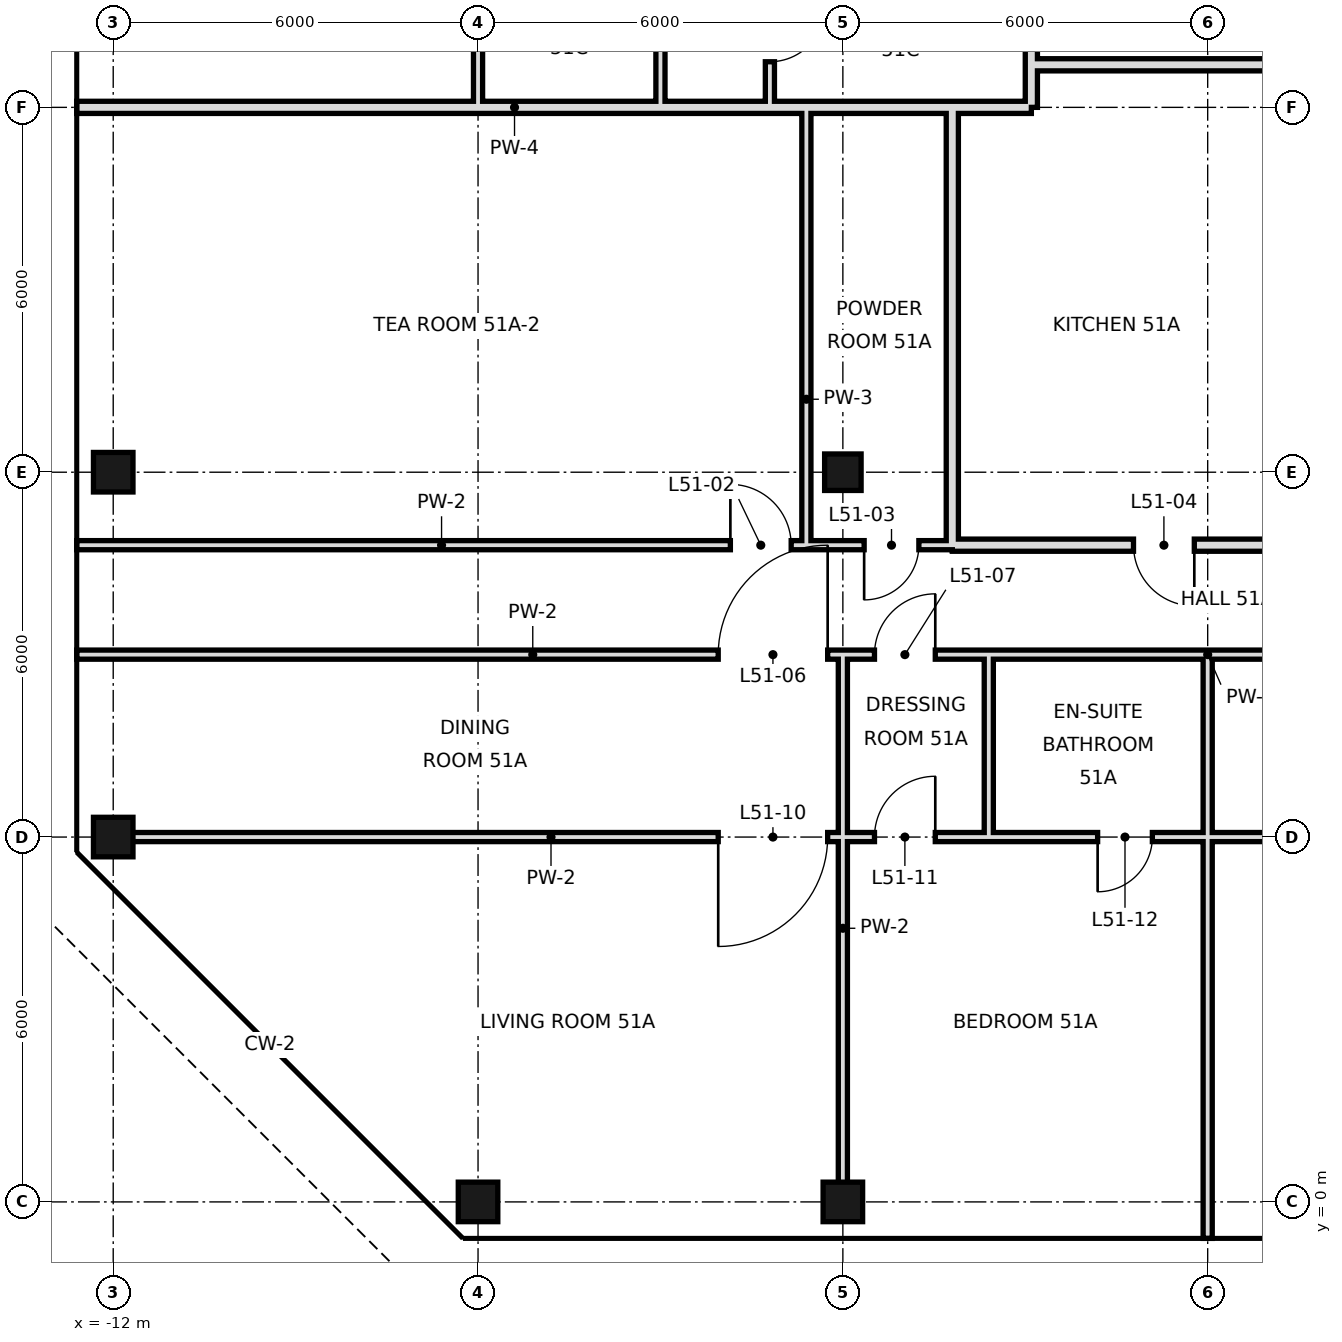
"""IFC4 building model, lengths in metres.
Left out: names, types, materials, properties, quantities, classifications, styles, units other than length and angle.
Written with IfcOpenShell. Run it as: python <this file> out.ifc"""

import sys

from ifc_helpers import new_model, si_unit, direction, frame, frame_2d, origin, origin_2d, place, context, subcontext, project, spatial, rectangle, hollow_rectangle, extrude, element, fill, save


model = new_model("IFC4")
c1 = context("Model", 3, precision=1e-05, world=origin(), true_north=direction((0.0, 1.0)))
c2 = subcontext(c1, "Body", "Model", "MODEL_VIEW")
j1 = project(units=[si_unit("LENGTHUNIT", "METRE"), si_unit("PLANEANGLEUNIT", "RADIAN")], contexts=[c1])
p1 = place(None, origin())
s1 = spatial("IfcSite", under=j1, at=p1, CompositionType="ELEMENT")
p2 = place(p1, origin())
s2 = spatial("IfcBuilding", under=s1, at=p2, CompositionType="ELEMENT")
p3 = place(p2, frame((0.0, 0.0, 219.0)))
s3 = spatial("IfcBuildingStorey", under=s2, at=p3, CompositionType="ELEMENT", Elevation=219.0)
for number, where, z_axis, x_axis in (
    (1, (-12.0, 6.0, 0.0), (0.0, 0.0, 1.0), (1.0, 0.0, 0.0)),
    (2, (-12.0, 12.0, 0.0), (0.0, 0.0, 1.0), (1.0, 0.0, 0.0)),
    (3, (-6.0, 0.0, 0.0), (0.0, 0.0, 1.0), (1.0, 0.0, 0.0)),
    (4, (0.0, 0.0, 0.0), (0.0, 0.0, 1.0), (1.0, 0.0, 0.0)),
):
    element("IfcColumn", number, at=place(p3, frame(where, z_axis=z_axis, x_axis=x_axis)), inside=s3, PredefinedType="COLUMN", context=c2, shape_type="SweptSolid", body=[
        extrude(hollow_rectangle(XDim=0.65, YDim=0.65, WallThickness=0.032, at=origin_2d()), origin(), (0.0, 0.0, 1.0), 3.6),
    ])
p4 = place(p3, frame((0.0, 12.0, 0.0), z_axis=(0.0, 0.0, 1.0), x_axis=(1.0, 0.0, 0.0)))
e5 = element("IfcColumn", 5, at=p4, inside=s3, PredefinedType="COLUMN", context=c2, shape_type="SweptSolid", body=[
    extrude(hollow_rectangle(XDim=0.6, YDim=0.6, WallThickness=0.028, at=origin_2d()), origin(), (0.0, 0.0, 1.0), 3.6),
])
p5 = place(p3, frame((-0.6, 10.8, 0.0), z_axis=(0.0, 0.0, 1.0), x_axis=(0.0, 1.0, 0.0)))
e6 = element("IfcWall", 6, at=p5, inside=s3, PredefinedType="PARTITIONING", context=c2, shape_type="SweptSolid", body=[
    extrude(rectangle(XDim=7.2, YDim=0.15, at=frame_2d((3.6, 0.0))), origin(), (0.0, 0.0, 1.0), 3.42),
])
p6 = place(p3, frame((-1.2, 18.0, 0.0), z_axis=(0.0, 0.0, 1.0), x_axis=(0.0, 1.0, 0.0)))
e7 = element("IfcWall", 7, at=p6, inside=s3, PredefinedType="PARTITIONING", context=c2, shape_type="SweptSolid", body=[
    extrude(rectangle(XDim=2.4, YDim=0.15, at=frame_2d((1.2, 0.0))), origin(), (0.0, 0.0, 1.0), 3.42),
])
p7 = place(p6, frame((0.75, 0.0, 0.0)))
e8 = element("IfcOpeningElement", 8, at=p7, cuts=e7, PredefinedType="OPENING", context=c2, shape_type="SweptSolid", body=[
    extrude(rectangle(XDim=0.9, YDim=2.4, at=frame_2d((0.45, 1.2))), frame((0.0, 0.085, 0.0), z_axis=(0.0, -1.0, 0.0), x_axis=(1.0, 0.0, 0.0)), (0.0, 0.0, 1.0), 0.17),
])
p8 = place(p3, frame((-3.0, 18.0, 0.0), z_axis=(0.0, 0.0, 1.0), x_axis=(0.0, 1.0, 0.0)))
e9 = element("IfcWall", 9, at=p8, inside=s3, PredefinedType="PARTITIONING", context=c2, shape_type="SweptSolid", body=[
    extrude(rectangle(XDim=3.0, YDim=0.15, at=frame_2d((1.5, 0.0))), origin(), (0.0, 0.0, 1.0), 3.42),
])
p9 = place(p3, frame((-6.0, 18.0, 0.0), z_axis=(0.0, 0.0, 1.0), x_axis=(0.0, 1.0, 0.0)))
e10 = element("IfcWall", 10, at=p9, inside=s3, PredefinedType="PARTITIONING", context=c2, shape_type="SweptSolid", body=[
    extrude(rectangle(XDim=3.0, YDim=0.15, at=frame_2d((1.5, 0.0))), origin(), (0.0, 0.0, 1.0), 3.42),
])
p10 = place(p9, frame((1.05, 0.0, 0.0)))
e11 = element("IfcOpeningElement", 11, at=p10, cuts=e10, PredefinedType="OPENING", context=c2, shape_type="SweptSolid", body=[
    extrude(rectangle(XDim=0.9, YDim=2.4, at=frame_2d((0.45, 1.2))), frame((0.0, 0.085, 0.0), z_axis=(0.0, -1.0, 0.0), x_axis=(1.0, 0.0, 0.0)), (0.0, 0.0, 1.0), 0.17),
])
p11 = place(p3, frame((0.0, 0.0, 0.0), z_axis=(0.0, 0.0, 1.0), x_axis=(0.0, 1.0, 0.0)))
e12 = element("IfcWall", 12, at=p11, inside=s3, PredefinedType="PARTITIONING", context=c2, shape_type="SweptSolid", body=[
    extrude(rectangle(XDim=9.0, YDim=0.15, at=frame_2d((4.5, 0.0))), origin(), (0.0, 0.0, 1.0), 2.72),
])
p12 = place(p3, frame((1.8, 10.8, 0.0), z_axis=(0.0, 0.0, 1.0), x_axis=(0.0, 1.0, 0.0)))
e13 = element("IfcWall", 13, at=p12, inside=s3, PredefinedType="SOLIDWALL", context=c2, shape_type="SweptSolid", body=[
    extrude(rectangle(XDim=7.2, YDim=0.2, at=frame_2d((3.6, 0.0))), origin(), (0.0, 0.0, 1.0), 3.42),
])
p13 = place(p3, frame((2.4, 6.0, 0.0), z_axis=(0.0, 0.0, 1.0), x_axis=(0.0, 1.0, 0.0)))
e14 = element("IfcWall", 14, at=p13, inside=s3, PredefinedType="PARTITIONING", context=c2, shape_type="SweptSolid", body=[
    extrude(rectangle(XDim=3.0, YDim=0.15, at=frame_2d((1.5, 0.0))), origin(), (0.0, 0.0, 1.0), 3.42),
])
p14 = place(p3, frame((3.1, 18.7, 0.0), z_axis=(0.0, 0.0, 1.0), x_axis=(0.0, 1.0, 0.0)))
e15 = element("IfcWall", 15, at=p14, inside=s3, PredefinedType="SOLIDWALL", context=c2, shape_type="SweptSolid", body=[
    extrude(rectangle(XDim=15.5, YDim=0.2, at=frame_2d((7.75, 0.0))), origin(), (0.0, 0.0, 1.0), 2.97),
])
p15 = place(p14, frame((4.96, 0.0, 0.0)))
e16 = element("IfcOpeningElement", 16, at=p15, cuts=e15, PredefinedType="OPENING", context=c2, shape_type="SweptSolid", body=[
    extrude(rectangle(XDim=1.2, YDim=2.4, at=frame_2d((0.6, 1.2))), frame((0.0, 0.11, 0.0), z_axis=(0.0, -1.0, 0.0), x_axis=(1.0, 0.0, 0.0)), (0.0, 0.0, 1.0), 0.22),
])
p16 = place(p3, frame((3.1, 18.0, 0.0), z_axis=(0.0, 0.0, 1.0), x_axis=(0.0, 1.0, 0.0)))
e17 = element("IfcWall", 17, at=p16, inside=s3, PredefinedType="SOLIDWALL", context=c2, shape_type="SweptSolid", body=[
    extrude(rectangle(XDim=0.7, YDim=0.2, at=frame_2d((0.35, 0.0))), origin(), (0.0, 0.0, 1.0), 2.97),
])
p17 = place(p3, frame((6.0, -0.6, 0.0), z_axis=(0.0, 0.0, 1.0), x_axis=(0.0, 1.0, 0.0)))
e18 = element("IfcWall", 18, at=p17, inside=s3, PredefinedType="PARTITIONING", context=c2, shape_type="SweptSolid", body=[
    extrude(rectangle(XDim=6.6, YDim=0.15, at=frame_2d((3.3, 0.0))), origin(), (0.0, 0.0, 1.0), 2.72),
])
p18 = place(p3, frame((6.0, 6.0, 0.0), z_axis=(0.0, 0.0, 1.0), x_axis=(0.0, 1.0, 0.0)))
e19 = element("IfcWall", 19, at=p18, inside=s3, PredefinedType="PARTITIONING", context=c2, shape_type="SweptSolid", body=[
    extrude(rectangle(XDim=3.0, YDim=0.15, at=frame_2d((1.5, 0.0))), origin(), (0.0, 0.0, 1.0), 2.72),
])
p19 = place(p3, frame((1.8, 10.8, 0.0), z_axis=(0.0, 0.0, 1.0), x_axis=(1.0, 0.0, 0.0)))
e20 = element("IfcWall", 20, at=p19, inside=s3, PredefinedType="SOLIDWALL", context=c2, shape_type="SweptSolid", body=[
    extrude(rectangle(XDim=5.4, YDim=0.2, at=frame_2d((2.7, 0.0))), origin(), (0.0, 0.0, 1.0), 2.72),
])
p20 = place(p19, frame((2.98, 0.0, 0.0)))
e21 = element("IfcOpeningElement", 21, at=p20, cuts=e20, PredefinedType="OPENING", context=c2, shape_type="SweptSolid", body=[
    extrude(rectangle(XDim=1.0, YDim=2.4, at=frame_2d((0.5, 1.2))), frame((0.0, 0.11, 0.0), z_axis=(0.0, -1.0, 0.0), x_axis=(1.0, 0.0, 0.0)), (0.0, 0.0, 1.0), 0.22),
])
p21 = place(p3, frame((-12.6, 10.8, 0.0), z_axis=(0.0, 0.0, 1.0), x_axis=(1.0, 0.0, 0.0)))
e22 = element("IfcWall", 22, at=p21, inside=s3, PredefinedType="PARTITIONING", context=c2, shape_type="SweptSolid", body=[
    extrude(rectangle(XDim=12.0, YDim=0.15, at=frame_2d((6.0, 0.0))), origin(), (0.0, 0.0, 1.0), 3.42),
])
p22 = place(p21, frame((10.75, 0.0, 0.0)))
e23 = element("IfcOpeningElement", 23, at=p22, cuts=e22, PredefinedType="OPENING", context=c2, shape_type="SweptSolid", body=[
    extrude(rectangle(XDim=1.0, YDim=2.4, at=frame_2d((0.5, 1.2))), frame((0.0, 0.085, 0.0), z_axis=(0.0, -1.0, 0.0), x_axis=(1.0, 0.0, 0.0)), (0.0, 0.0, 1.0), 0.17),
])
p23 = place(p3, frame((-0.6, 10.8, 0.0), z_axis=(0.0, 0.0, 1.0), x_axis=(1.0, 0.0, 0.0)))
e24 = element("IfcWall", 24, at=p23, inside=s3, PredefinedType="PARTITIONING", context=c2, shape_type="SweptSolid", body=[
    extrude(rectangle(XDim=2.4, YDim=0.15, at=frame_2d((1.2, 0.0))), origin(), (0.0, 0.0, 1.0), 3.42),
])
p24 = place(p23, frame((0.95, 0.0, 0.0)))
e25 = element("IfcOpeningElement", 25, at=p24, cuts=e24, PredefinedType="OPENING", context=c2, shape_type="SweptSolid", body=[
    extrude(rectangle(XDim=0.9, YDim=2.4, at=frame_2d((0.45, 1.2))), frame((0.0, 0.085, 0.0), z_axis=(0.0, -1.0, 0.0), x_axis=(1.0, 0.0, 0.0)), (0.0, 0.0, 1.0), 0.17),
])
p25 = place(p3, frame((1.8, 18.0, 0.0), z_axis=(0.0, 0.0, 1.0), x_axis=(1.0, 0.0, 0.0)))
e26 = element("IfcWall", 26, at=p25, inside=s3, PredefinedType="SOLIDWALL", context=c2, shape_type="SweptSolid", body=[
    extrude(rectangle(XDim=1.3, YDim=0.2, at=frame_2d((0.65, 0.0))), origin(), (0.0, 0.0, 1.0), 2.97),
])
p26 = place(p3, frame((-12.6, 18.0, 0.0), z_axis=(0.0, 0.0, 1.0), x_axis=(1.0, 0.0, 0.0)))
e27 = element("IfcWall", 27, at=p26, inside=s3, PredefinedType="SOLIDWALL", context=c2, shape_type="SweptSolid", body=[
    extrude(rectangle(XDim=14.4, YDim=0.2, at=frame_2d((7.2, 0.0))), origin(), (0.0, 0.0, 1.0), 2.72),
])
p27 = place(p3, frame((3.1, 18.7, 0.0), z_axis=(0.0, 0.0, 1.0), x_axis=(1.0, 0.0, 0.0)))
e28 = element("IfcWall", 28, at=p27, inside=s3, PredefinedType="SOLIDWALL", context=c2, shape_type="SweptSolid", body=[
    extrude(rectangle(XDim=4.1, YDim=0.2, at=frame_2d((2.05, 0.0))), origin(), (0.0, 0.0, 1.0), 2.72),
])
p28 = place(p3, frame((-12.0, 6.0, 0.0), z_axis=(0.0, 0.0, 1.0), x_axis=(1.0, 0.0, 0.0)))
e29 = element("IfcWall", 29, at=p28, inside=s3, PredefinedType="PARTITIONING", context=c2, shape_type="SweptSolid", body=[
    extrude(rectangle(XDim=14.4, YDim=0.15, at=frame_2d((7.2, 0.0))), origin(), (0.0, 0.0, 1.0), 2.72),
])
p29 = place(p28, frame((9.95, 0.0, 0.0)))
e30 = element("IfcOpeningElement", 30, at=p29, cuts=e29, PredefinedType="OPENING", context=c2, shape_type="SweptSolid", body=[
    extrude(rectangle(XDim=1.8, YDim=2.4, at=frame_2d((0.9, 1.2))), frame((0.0, 0.085, 0.0), z_axis=(0.0, -1.0, 0.0), x_axis=(1.0, 0.0, 0.0)), (0.0, 0.0, 1.0), 0.17),
])
p30 = place(p28, frame((12.52, 0.0, 0.0)))
e31 = element("IfcOpeningElement", 31, at=p30, cuts=e29, PredefinedType="OPENING", context=c2, shape_type="SweptSolid", body=[
    extrude(rectangle(XDim=1.0, YDim=2.4, at=frame_2d((0.5, 1.2))), frame((0.0, 0.085, 0.0), z_axis=(0.0, -1.0, 0.0), x_axis=(1.0, 0.0, 0.0)), (0.0, 0.0, 1.0), 0.17),
])
p31 = place(p3, frame((6.0, 6.0, 0.0), z_axis=(0.0, 0.0, 1.0), x_axis=(1.0, 0.0, 0.0)))
e32 = element("IfcWall", 32, at=p31, inside=s3, PredefinedType="PARTITIONING", context=c2, shape_type="SweptSolid", body=[
    extrude(rectangle(XDim=12.0, YDim=0.15, at=frame_2d((6.0, 0.0))), origin(), (0.0, 0.0, 1.0), 2.97),
])
p32 = place(p31, frame((3.4, 0.0, 0.0)))
e33 = element("IfcOpeningElement", 33, at=p32, cuts=e32, PredefinedType="OPENING", context=c2, shape_type="SweptSolid", body=[
    extrude(rectangle(XDim=1.0, YDim=2.4, at=frame_2d((0.5, 1.2))), frame((0.0, 0.085, 0.0), z_axis=(0.0, -1.0, 0.0), x_axis=(1.0, 0.0, 0.0)), (0.0, 0.0, 1.0), 0.17),
])
p33 = place(p3, frame((2.4, 6.0, 0.0), z_axis=(0.0, 0.0, 1.0), x_axis=(1.0, 0.0, 0.0)))
e34 = element("IfcWall", 34, at=p33, inside=s3, PredefinedType="PARTITIONING", context=c2, shape_type="SweptSolid", body=[
    extrude(rectangle(XDim=3.6, YDim=0.15, at=frame_2d((1.8, 0.0))), origin(), (0.0, 0.0, 1.0), 2.97),
])
p34 = place(p33, frame((1.79, 0.0, 0.0)))
e35 = element("IfcOpeningElement", 35, at=p34, cuts=e34, PredefinedType="OPENING", context=c2, shape_type="SweptSolid", body=[
    extrude(rectangle(XDim=0.9, YDim=2.4, at=frame_2d((0.45, 1.2))), frame((0.0, 0.085, 0.0), z_axis=(0.0, -1.0, 0.0), x_axis=(1.0, 0.0, 0.0)), (0.0, 0.0, 1.0), 0.17),
])
p35 = place(p3, frame((-12.6, 9.0, 0.0), z_axis=(0.0, 0.0, 1.0), x_axis=(1.0, 0.0, 0.0)))
e36 = element("IfcWall", 36, at=p35, inside=s3, PredefinedType="PARTITIONING", context=c2, shape_type="SweptSolid", body=[
    extrude(rectangle(XDim=15.0, YDim=0.15, at=frame_2d((7.5, 0.0))), origin(), (0.0, 0.0, 1.0), 3.42),
])
p36 = place(p35, frame((10.55, 0.0, 0.0)))
e37 = element("IfcOpeningElement", 37, at=p36, cuts=e36, PredefinedType="OPENING", context=c2, shape_type="SweptSolid", body=[
    extrude(rectangle(XDim=1.8, YDim=2.4, at=frame_2d((0.9, 1.2))), frame((0.0, 0.085, 0.0), z_axis=(0.0, -1.0, 0.0), x_axis=(1.0, 0.0, 0.0)), (0.0, 0.0, 1.0), 0.17),
])
p37 = place(p35, frame((13.12, 0.0, 0.0)))
e38 = element("IfcOpeningElement", 38, at=p37, cuts=e36, PredefinedType="OPENING", context=c2, shape_type="SweptSolid", body=[
    extrude(rectangle(XDim=1.0, YDim=2.4, at=frame_2d((0.5, 1.2))), frame((0.0, 0.085, 0.0), z_axis=(0.0, -1.0, 0.0), x_axis=(1.0, 0.0, 0.0)), (0.0, 0.0, 1.0), 0.17),
])
p38 = place(p3, frame((6.0, 9.0, 0.0), z_axis=(0.0, 0.0, 1.0), x_axis=(1.0, 0.0, 0.0)))
e39 = element("IfcWall", 39, at=p38, inside=s3, PredefinedType="PARTITIONING", context=c2, shape_type="SweptSolid", body=[
    extrude(rectangle(XDim=18.0, YDim=0.15, at=frame_2d((9.0, 0.0))), origin(), (0.0, 0.0, 1.0), 3.42),
])
p39 = place(p38, frame((5.5, 0.0, 0.0)))
e40 = element("IfcOpeningElement", 40, at=p39, cuts=e39, PredefinedType="OPENING", context=c2, shape_type="SweptSolid", body=[
    extrude(rectangle(XDim=1.0, YDim=2.4, at=frame_2d((0.5, 1.2))), frame((0.0, 0.085, 0.0), z_axis=(0.0, -1.0, 0.0), x_axis=(1.0, 0.0, 0.0)), (0.0, 0.0, 1.0), 0.17),
])
p40 = place(p38, frame((13.6, 0.0, 0.0)))
e41 = element("IfcOpeningElement", 41, at=p40, cuts=e39, PredefinedType="OPENING", context=c2, shape_type="SweptSolid", body=[
    extrude(rectangle(XDim=1.0, YDim=2.4, at=frame_2d((0.5, 1.2))), frame((0.0, 0.085, 0.0), z_axis=(0.0, -1.0, 0.0), x_axis=(1.0, 0.0, 0.0)), (0.0, 0.0, 1.0), 0.17),
])
p41 = place(p3, frame((2.4, 9.0, 0.0), z_axis=(0.0, 0.0, 1.0), x_axis=(1.0, 0.0, 0.0)))
e42 = element("IfcWall", 42, at=p41, inside=s3, PredefinedType="PARTITIONING", context=c2, shape_type="SweptSolid", body=[
    extrude(rectangle(XDim=3.6, YDim=0.15, at=frame_2d((1.8, 0.0))), origin(), (0.0, 0.0, 1.0), 3.42),
])
p42 = place(p22, origin())
e43 = element("IfcDoor", 43, at=p42, inside=s3, OperationType="SINGLE_SWING_LEFT", PredefinedType="DOOR", context=c2, shape_type="SweptSolid", body=[
    extrude(rectangle(XDim=1.0, YDim=2.4, at=frame_2d((0.5, 1.2))), frame((0.0, 0.025, 0.0), z_axis=(0.0, -1.0, 0.0), x_axis=(1.0, 0.0, 0.0)), (0.0, 0.0, 1.0), 0.05),
])
fill(e23, e43)
p43 = place(p24, frame((0.9, 0.0, 0.0), z_axis=(0.0, 0.0, 1.0), x_axis=(-1.0, 0.0, 0.0)))
e44 = element("IfcDoor", 44, at=p43, inside=s3, OperationType="SINGLE_SWING_RIGHT", PredefinedType="DOOR", context=c2, shape_type="SweptSolid", body=[
    extrude(rectangle(XDim=0.9, YDim=2.4, at=frame_2d((0.45, 1.2))), frame((0.0, 0.025, 0.0), z_axis=(0.0, -1.0, 0.0), x_axis=(1.0, 0.0, 0.0)), (0.0, 0.0, 1.0), 0.05),
])
fill(e25, e44)
p44 = place(p20, origin())
e45 = element("IfcDoor", 45, at=p44, inside=s3, OperationType="SINGLE_SWING_RIGHT", PredefinedType="DOOR", context=c2, shape_type="SweptSolid", body=[
    extrude(rectangle(XDim=1.0, YDim=2.4, at=frame_2d((0.5, 1.2))), frame((0.0, 0.025, 0.0), z_axis=(0.0, -1.0, 0.0), x_axis=(1.0, 0.0, 0.0)), (0.0, 0.0, 1.0), 0.05),
])
fill(e21, e45)
p45 = place(p36, frame((1.8, 0.0, 0.0), z_axis=(0.0, 0.0, 1.0), x_axis=(-1.0, 0.0, 0.0)))
e46 = element("IfcDoor", 46, at=p45, inside=s3, OperationType="SINGLE_SWING_LEFT", PredefinedType="DOOR", context=c2, shape_type="SweptSolid", body=[
    extrude(rectangle(XDim=1.8, YDim=2.4, at=frame_2d((0.9, 1.2))), frame((0.0, 0.025, 0.0), z_axis=(0.0, -1.0, 0.0), x_axis=(1.0, 0.0, 0.0)), (0.0, 0.0, 1.0), 0.05),
])
fill(e37, e46)
p46 = place(p37, frame((1.0, 0.0, 0.0), z_axis=(0.0, 0.0, 1.0), x_axis=(-1.0, 0.0, 0.0)))
e47 = element("IfcDoor", 47, at=p46, inside=s3, OperationType="SINGLE_SWING_LEFT", PredefinedType="DOOR", context=c2, shape_type="SweptSolid", body=[
    extrude(rectangle(XDim=1.0, YDim=2.4, at=frame_2d((0.5, 1.2))), frame((0.0, 0.025, 0.0), z_axis=(0.0, -1.0, 0.0), x_axis=(1.0, 0.0, 0.0)), (0.0, 0.0, 1.0), 0.05),
])
fill(e38, e47)
p47 = place(p29, frame((1.8, 0.0, 0.0), z_axis=(0.0, 0.0, 1.0), x_axis=(-1.0, 0.0, 0.0)))
e48 = element("IfcDoor", 48, at=p47, inside=s3, OperationType="SINGLE_SWING_RIGHT", PredefinedType="DOOR", context=c2, shape_type="SweptSolid", body=[
    extrude(rectangle(XDim=1.8, YDim=2.4, at=frame_2d((0.9, 1.2))), frame((0.0, 0.025, 0.0), z_axis=(0.0, -1.0, 0.0), x_axis=(1.0, 0.0, 0.0)), (0.0, 0.0, 1.0), 0.05),
])
fill(e30, e48)
p48 = place(p30, frame((1.0, 0.0, 0.0), z_axis=(0.0, 0.0, 1.0), x_axis=(-1.0, 0.0, 0.0)))
e49 = element("IfcDoor", 49, at=p48, inside=s3, OperationType="SINGLE_SWING_LEFT", PredefinedType="DOOR", context=c2, shape_type="SweptSolid", body=[
    extrude(rectangle(XDim=1.0, YDim=2.4, at=frame_2d((0.5, 1.2))), frame((0.0, 0.025, 0.0), z_axis=(0.0, -1.0, 0.0), x_axis=(1.0, 0.0, 0.0)), (0.0, 0.0, 1.0), 0.05),
])
fill(e31, e49)
p49 = place(p34, frame((0.9, 0.0, 0.0), z_axis=(0.0, 0.0, 1.0), x_axis=(-1.0, 0.0, 0.0)))
e50 = element("IfcDoor", 50, at=p49, inside=s3, OperationType="SINGLE_SWING_RIGHT", PredefinedType="DOOR", context=c2, shape_type="SweptSolid", body=[
    extrude(rectangle(XDim=0.9, YDim=2.4, at=frame_2d((0.45, 1.2))), frame((0.0, 0.025, 0.0), z_axis=(0.0, -1.0, 0.0), x_axis=(1.0, 0.0, 0.0)), (0.0, 0.0, 1.0), 0.05),
])
fill(e35, e50)
p50 = place(p7, origin())
e51 = element("IfcDoor", 51, at=p50, inside=s3, OperationType="SINGLE_SWING_RIGHT", PredefinedType="DOOR", context=c2, shape_type="SweptSolid", body=[
    extrude(rectangle(XDim=0.9, YDim=2.4, at=frame_2d((0.45, 1.2))), frame((0.0, 0.025, 0.0), z_axis=(0.0, -1.0, 0.0), x_axis=(1.0, 0.0, 0.0)), (0.0, 0.0, 1.0), 0.05),
])
fill(e8, e51)
save(model, sys.argv[1])
